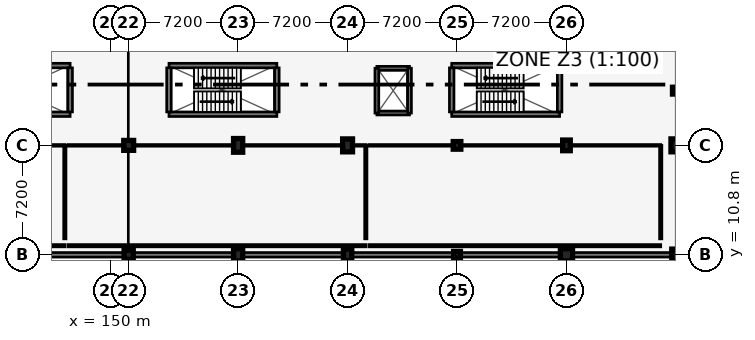
"""IFC4 building model, lengths in metres.
Left out: names, types, materials, properties, quantities, classifications, styles, units other than length and angle.
Written with IfcOpenShell. Run it as: python <this file> out.ifc"""

import sys

from ifc_helpers import new_model, si_unit, direction, frame, frame_2d, origin, origin_2d, place, context, subcontext, project, spatial, rectangle, extrude, element, fill, save


model = new_model("IFC4")
c1 = context("Model", 3, precision=1e-05, world=origin(), true_north=direction((0.0, 1.0)))
c2 = subcontext(c1, "Body", "Model", "MODEL_VIEW")
j1 = project(units=[si_unit("LENGTHUNIT", "METRE"), si_unit("PLANEANGLEUNIT", "RADIAN")], contexts=[c1])
p1 = place(None, origin())
s1 = spatial("IfcSite", under=j1, at=p1, CompositionType="ELEMENT")
p2 = place(p1, origin())
s2 = spatial("IfcBuilding", under=s1, at=p2, CompositionType="ELEMENT")
p3 = place(p2, frame((0.0, 0.0, 4.8)))
s3 = spatial("IfcBuildingStorey", under=s2, at=p3, CompositionType="ELEMENT", Elevation=4.8)
p4 = place(p3, frame((151.2, 10.8, 0.0), z_axis=(0.0, 0.0, 1.0), x_axis=(1.0, 0.0, 0.0)))
e1 = element("IfcColumn", 1, at=p4, inside=s3, PredefinedType="COLUMN", context=c2, shape_type="SweptSolid", body=[
    extrude(rectangle(XDim=0.6, YDim=0.6, at=origin_2d()), origin(), (0.0, 0.0, 1.0), 4.2),
])
p5 = place(p3, frame((151.2, 18.0, 0.0), z_axis=(0.0, 0.0, 1.0), x_axis=(1.0, 0.0, 0.0)))
e2 = element("IfcColumn", 2, at=p5, inside=s3, PredefinedType="COLUMN", context=c2, shape_type="SweptSolid", body=[
    extrude(rectangle(XDim=0.65, YDim=0.65, at=origin_2d()), origin(), (0.0, 0.0, 1.0), 4.2),
])
p6 = place(p3, frame((158.4, 10.8, 0.0), z_axis=(0.0, 0.0, 1.0), x_axis=(1.0, 0.0, 0.0)))
e3 = element("IfcColumn", 3, at=p6, inside=s3, PredefinedType="COLUMN", context=c2, shape_type="SweptSolid", body=[
    extrude(rectangle(XDim=0.6, YDim=0.8, at=origin_2d()), origin(), (0.0, 0.0, 1.0), 4.2),
])
p7 = place(p3, frame((158.4, 18.0, 0.0), z_axis=(0.0, 0.0, 1.0), x_axis=(1.0, 0.0, 0.0)))
e4 = element("IfcColumn", 4, at=p7, inside=s3, PredefinedType="COLUMN", context=c2, shape_type="SweptSolid", body=[
    extrude(rectangle(XDim=0.6, YDim=0.9, at=origin_2d()), origin(), (0.0, 0.0, 1.0), 4.2),
])
p8 = place(p3, frame((165.6, 10.8, 0.0), z_axis=(0.0, 0.0, 1.0), x_axis=(1.0, 0.0, 0.0)))
e5 = element("IfcColumn", 5, at=p8, inside=s3, PredefinedType="COLUMN", context=c2, shape_type="SweptSolid", body=[
    extrude(rectangle(XDim=0.55, YDim=0.75, at=origin_2d()), origin(), (0.0, 0.0, 1.0), 4.2),
])
p9 = place(p3, frame((165.6, 18.0, 0.0), z_axis=(0.0, 0.0, 1.0), x_axis=(1.0, 0.0, 0.0)))
e6 = element("IfcColumn", 6, at=p9, inside=s3, PredefinedType="COLUMN", context=c2, shape_type="SweptSolid", body=[
    extrude(rectangle(XDim=0.65, YDim=0.85, at=origin_2d()), origin(), (0.0, 0.0, 1.0), 4.2),
])
p10 = place(p3, frame((172.8, 10.8, 0.0), z_axis=(0.0, 0.0, 1.0), x_axis=(1.0, 0.0, 0.0)))
e7 = element("IfcColumn", 7, at=p10, inside=s3, PredefinedType="COLUMN", context=c2, shape_type="SweptSolid", body=[
    extrude(rectangle(XDim=0.45, YDim=0.45, at=origin_2d()), origin(), (0.0, 0.0, 1.0), 4.2),
])
p11 = place(p3, frame((172.8, 18.0, 0.0), z_axis=(0.0, 0.0, 1.0), x_axis=(1.0, 0.0, 0.0)))
e8 = element("IfcColumn", 8, at=p11, inside=s3, PredefinedType="COLUMN", context=c2, shape_type="SweptSolid", body=[
    extrude(rectangle(XDim=0.5, YDim=0.5, at=origin_2d()), origin(), (0.0, 0.0, 1.0), 4.2),
])
p12 = place(p3, frame((180.0, 10.8, 0.0), z_axis=(0.0, 0.0, 1.0), x_axis=(1.0, 0.0, 0.0)))
e9 = element("IfcColumn", 9, at=p12, inside=s3, PredefinedType="COLUMN", context=c2, shape_type="SweptSolid", body=[
    extrude(rectangle(XDim=0.8, YDim=0.8, at=origin_2d()), origin(), (0.0, 0.0, 1.0), 4.2),
])
p13 = place(p3, frame((180.0, 18.0, 0.0), z_axis=(0.0, 0.0, 1.0), x_axis=(1.0, 0.0, 0.0)))
e10 = element("IfcColumn", 10, at=p13, inside=s3, PredefinedType="COLUMN", context=c2, shape_type="SweptSolid", body=[
    extrude(rectangle(XDim=0.5, YDim=0.7, at=origin_2d()), origin(), (0.0, 0.0, 1.0), 4.2),
])
p14 = place(p3, frame((187.2, 10.8, 0.0), z_axis=(0.0, 0.0, 1.0), x_axis=(1.0, 0.0, 0.0)))
e11 = element("IfcColumn", 11, at=p14, inside=s3, PredefinedType="COLUMN", context=c2, shape_type="SweptSolid", body=[
    extrude(rectangle(XDim=0.55, YDim=0.75, at=origin_2d()), origin(), (0.0, 0.0, 1.0), 4.2),
])
p15 = place(p3, frame((187.2, 18.0, 0.0), z_axis=(0.0, 0.0, 1.0), x_axis=(1.0, 0.0, 0.0)))
e12 = element("IfcColumn", 12, at=p15, inside=s3, PredefinedType="COLUMN", context=c2, shape_type="SweptSolid", body=[
    extrude(rectangle(XDim=0.65, YDim=0.85, at=origin_2d()), origin(), (0.0, 0.0, 1.0), 4.2),
])
p16 = place(p3, frame((187.2, 21.6, 0.0), z_axis=(0.0, 0.0, 1.0), x_axis=(1.0, 0.0, 0.0)))
e13 = element("IfcColumn", 13, at=p16, inside=s3, PredefinedType="COLUMN", context=c2, shape_type="SweptSolid", body=[
    extrude(rectangle(XDim=0.45, YDim=0.45, at=origin_2d()), origin(), (0.0, 0.0, 1.0), 4.2),
])
p17 = place(p3, frame((108.0, 10.8, 0.0), z_axis=(0.0, 0.0, 1.0), x_axis=(1.0, 0.0, 0.0)))
e14 = element("IfcWall", 14, at=p17, inside=s3, PredefinedType="SOLIDWALL", context=c2, shape_type="SweptSolid", body=[
    extrude(rectangle(XDim=79.2, YDim=0.3, at=frame_2d((39.6, 0.0))), origin(), (0.0, 0.0, 1.0), 2.872),
])
p18 = place(p3, frame((140.25, 20.05, 0.0), z_axis=(0.0, 0.0, 1.0), x_axis=(1.0, 0.0, 0.0)))
e15 = element("IfcWall", 15, at=p18, inside=s3, PredefinedType="SHEAR", context=c2, shape_type="SweptSolid", body=[
    extrude(rectangle(XDim=7.1, YDim=0.3, at=frame_2d((3.55, 0.0))), origin(), (0.0, 0.0, 1.0), 3.84),
])
p19 = place(p18, frame((0.35, 0.0, 0.0)))
e16 = element("IfcOpeningElement", 16, at=p19, cuts=e15, PredefinedType="OPENING", context=c2, shape_type="SweptSolid", body=[
    extrude(rectangle(XDim=1.07, YDim=2.15, at=frame_2d((0.535, 1.075))), frame((0.0, 0.16, 0.0), z_axis=(0.0, -1.0, 0.0), x_axis=(1.0, 0.0, 0.0)), (0.0, 0.0, 1.0), 0.32),
])
p20 = place(p3, frame((147.35, 23.25, 0.0), z_axis=(0.0, 0.0, 1.0), x_axis=(-1.0, 0.0, 0.0)))
e17 = element("IfcWall", 17, at=p20, inside=s3, PredefinedType="SHEAR", context=c2, shape_type="SweptSolid", body=[
    extrude(rectangle(XDim=7.1, YDim=0.3, at=frame_2d((3.55, 0.0))), origin(), (0.0, 0.0, 1.0), 3.84),
])
p21 = place(p3, frame((147.35, 20.2, 0.0), z_axis=(0.0, 0.0, 1.0), x_axis=(0.0, 1.0, 0.0)))
e18 = element("IfcWall", 18, at=p21, inside=s3, PredefinedType="SHEAR", context=c2, shape_type="SweptSolid", body=[
    extrude(rectangle(XDim=2.9, YDim=0.3, at=frame_2d((1.45, 0.0))), origin(), (0.0, 0.0, 1.0), 3.84),
])
p22 = place(p3, frame((153.85, 20.05, 0.0), z_axis=(0.0, 0.0, 1.0), x_axis=(1.0, 0.0, 0.0)))
e19 = element("IfcWall", 19, at=p22, inside=s3, PredefinedType="SHEAR", context=c2, shape_type="SweptSolid", body=[
    extrude(rectangle(XDim=7.1, YDim=0.3, at=frame_2d((3.55, 0.0))), origin(), (0.0, 0.0, 1.0), 3.84),
])
p23 = place(p22, frame((0.35, 0.0, 0.0)))
e20 = element("IfcOpeningElement", 20, at=p23, cuts=e19, PredefinedType="OPENING", context=c2, shape_type="SweptSolid", body=[
    extrude(rectangle(XDim=1.07, YDim=2.15, at=frame_2d((0.535, 1.075))), frame((0.0, 0.16, 0.0), z_axis=(0.0, -1.0, 0.0), x_axis=(1.0, 0.0, 0.0)), (0.0, 0.0, 1.0), 0.32),
])
p24 = place(p3, frame((160.95, 23.25, 0.0), z_axis=(0.0, 0.0, 1.0), x_axis=(-1.0, 0.0, 0.0)))
e21 = element("IfcWall", 21, at=p24, inside=s3, PredefinedType="SHEAR", context=c2, shape_type="SweptSolid", body=[
    extrude(rectangle(XDim=7.1, YDim=0.3, at=frame_2d((3.55, 0.0))), origin(), (0.0, 0.0, 1.0), 3.84),
])
for number, where, z_axis, x_axis in (
    (22, (160.95, 20.2, 0.0), (0.0, 0.0, 1.0), (0.0, 1.0, 0.0)),
    (23, (153.85, 23.1, 0.0), (0.0, 0.0, 1.0), (0.0, -1.0, 0.0)),
):
    element("IfcWall", number, at=place(p3, frame(where, z_axis=z_axis, x_axis=x_axis)), inside=s3, PredefinedType="SHEAR", context=c2, shape_type="SweptSolid", body=[
        extrude(rectangle(XDim=2.9, YDim=0.3, at=frame_2d((1.45, 0.0))), origin(), (0.0, 0.0, 1.0), 3.84),
    ])
p25 = place(p3, frame((172.45, 20.05, 0.0), z_axis=(0.0, 0.0, 1.0), x_axis=(1.0, 0.0, 0.0)))
e24 = element("IfcWall", 24, at=p25, inside=s3, PredefinedType="SHEAR", context=c2, shape_type="SweptSolid", body=[
    extrude(rectangle(XDim=7.1, YDim=0.3, at=frame_2d((3.55, 0.0))), origin(), (0.0, 0.0, 1.0), 3.84),
])
p26 = place(p25, frame((0.35, 0.0, 0.0)))
e25 = element("IfcOpeningElement", 25, at=p26, cuts=e24, PredefinedType="OPENING", context=c2, shape_type="SweptSolid", body=[
    extrude(rectangle(XDim=1.07, YDim=2.15, at=frame_2d((0.535, 1.075))), frame((0.0, 0.16, 0.0), z_axis=(0.0, -1.0, 0.0), x_axis=(1.0, 0.0, 0.0)), (0.0, 0.0, 1.0), 0.32),
])
p27 = place(p3, frame((179.55, 23.25, 0.0), z_axis=(0.0, 0.0, 1.0), x_axis=(-1.0, 0.0, 0.0)))
e26 = element("IfcWall", 26, at=p27, inside=s3, PredefinedType="SHEAR", context=c2, shape_type="SweptSolid", body=[
    extrude(rectangle(XDim=7.1, YDim=0.3, at=frame_2d((3.55, 0.0))), origin(), (0.0, 0.0, 1.0), 3.84),
])
for number, where, z_axis, x_axis in (
    (27, (179.55, 20.2, 0.0), (0.0, 0.0, 1.0), (0.0, 1.0, 0.0)),
    (28, (172.45, 23.1, 0.0), (0.0, 0.0, 1.0), (0.0, -1.0, 0.0)),
):
    element("IfcWall", number, at=place(p3, frame(where, z_axis=z_axis, x_axis=x_axis)), inside=s3, PredefinedType="SHEAR", context=c2, shape_type="SweptSolid", body=[
        extrude(rectangle(XDim=2.9, YDim=0.3, at=frame_2d((1.45, 0.0))), origin(), (0.0, 0.0, 1.0), 3.84),
    ])
p28 = place(p3, frame((167.525, 20.125, 0.0), z_axis=(0.0, 0.0, 1.0), x_axis=(1.0, 0.0, 0.0)))
e29 = element("IfcWall", 29, at=p28, inside=s3, PredefinedType="SHEAR", context=c2, shape_type="SweptSolid", body=[
    extrude(rectangle(XDim=2.15, YDim=0.25, at=frame_2d((1.075, 0.0))), origin(), (0.0, 0.0, 1.0), 3.9),
])
p29 = place(p3, frame((169.675, 23.075, 0.0), z_axis=(0.0, 0.0, 1.0), x_axis=(-1.0, 0.0, 0.0)))
e30 = element("IfcWall", 30, at=p29, inside=s3, PredefinedType="SHEAR", context=c2, shape_type="SweptSolid", body=[
    extrude(rectangle(XDim=2.15, YDim=0.25, at=frame_2d((1.075, 0.0))), origin(), (0.0, 0.0, 1.0), 3.9),
])
p30 = place(p29, frame((0.525, 0.0, 0.0)))
e31 = element("IfcOpeningElement", 31, at=p30, cuts=e30, PredefinedType="OPENING", context=c2, shape_type="SweptSolid", body=[
    extrude(rectangle(XDim=1.1, YDim=2.15, at=frame_2d((0.55, 1.075))), frame((0.0, 0.135, 0.0), z_axis=(0.0, -1.0, 0.0), x_axis=(1.0, 0.0, 0.0)), (0.0, 0.0, 1.0), 0.27),
])
for number, where, z_axis, x_axis in (
    (32, (167.525, 23.075, 0.0), (0.0, 0.0, 1.0), (0.0, -1.0, 0.0)),
    (33, (169.675, 20.125, 0.0), (0.0, 0.0, 1.0), (0.0, 1.0, 0.0)),
):
    element("IfcWall", number, at=place(p3, frame(where, z_axis=z_axis, x_axis=x_axis)), inside=s3, PredefinedType="SHEAR", context=c2, shape_type="SweptSolid", body=[
        extrude(rectangle(XDim=2.95, YDim=0.25, at=frame_2d((1.475, 0.0))), origin(), (0.0, 0.0, 1.0), 3.9),
    ])
p31 = place(p3, frame((147.0, 11.4, 0.0), z_axis=(0.0, 0.0, 1.0), x_axis=(-1.0, 0.0, 0.0)))
e34 = element("IfcWall", 34, at=p31, inside=s3, PredefinedType="PARTITIONING", context=c2, shape_type="SweptSolid", body=[
    extrude(rectangle(XDim=18.8, YDim=0.15, at=frame_2d((9.4, 0.0))), origin(), (0.0, 0.0, 1.0), 3.122),
])
p32 = place(p3, frame((147.0, 11.85, 0.0), z_axis=(0.0, 0.0, 1.0), x_axis=(0.0, 1.0, 0.0)))
e35 = element("IfcWall", 35, at=p32, inside=s3, PredefinedType="PARTITIONING", context=c2, shape_type="SweptSolid", body=[
    extrude(rectangle(XDim=6.15, YDim=0.15, at=frame_2d((3.075, 0.0))), origin(), (0.0, 0.0, 1.0), 3.372),
])
p33 = place(p3, frame((128.2, 18.0, 0.0), z_axis=(0.0, 0.0, 1.0), x_axis=(1.0, 0.0, 0.0)))
e36 = element("IfcWall", 36, at=p33, inside=s3, PredefinedType="PARTITIONING", context=c2, shape_type="SweptSolid", body=[
    extrude(rectangle(XDim=18.8, YDim=0.11, at=frame_2d((9.4, 0.0))), origin(), (0.0, 0.0, 1.0), 2.822),
])
p34 = place(p33, frame((5.322, 0.0, 0.0)))
e37 = element("IfcOpeningElement", 37, at=p34, cuts=e36, PredefinedType="OPENING", context=c2, shape_type="SweptSolid", body=[
    extrude(rectangle(XDim=1.06, YDim=2.15, at=frame_2d((0.53, 1.075))), frame((0.0, 0.065, 0.0), z_axis=(0.0, -1.0, 0.0), x_axis=(1.0, 0.0, 0.0)), (0.0, 0.0, 1.0), 0.13),
])
p35 = place(p3, frame((166.8, 11.4, 0.0), z_axis=(0.0, 0.0, 1.0), x_axis=(-1.0, 0.0, 0.0)))
e38 = element("IfcWall", 38, at=p35, inside=s3, PredefinedType="PARTITIONING", context=c2, shape_type="SweptSolid", body=[
    extrude(rectangle(XDim=19.6, YDim=0.15, at=frame_2d((9.8, 0.0))), origin(), (0.0, 0.0, 1.0), 3.072),
])
p36 = place(p3, frame((166.8, 11.85, 0.0), z_axis=(0.0, 0.0, 1.0), x_axis=(0.0, 1.0, 0.0)))
e39 = element("IfcWall", 39, at=p36, inside=s3, PredefinedType="PARTITIONING", context=c2, shape_type="SweptSolid", body=[
    extrude(rectangle(XDim=6.15, YDim=0.15, at=frame_2d((3.075, 0.0))), origin(), (0.0, 0.0, 1.0), 3.272),
])
p37 = place(p3, frame((147.2, 18.0, 0.0), z_axis=(0.0, 0.0, 1.0), x_axis=(1.0, 0.0, 0.0)))
e40 = element("IfcWall", 40, at=p37, inside=s3, PredefinedType="PARTITIONING", context=c2, shape_type="SweptSolid", body=[
    extrude(rectangle(XDim=19.6, YDim=0.11, at=frame_2d((9.8, 0.0))), origin(), (0.0, 0.0, 1.0), 3.222),
])
p38 = place(p37, frame((9.28, 0.0, 0.0)))
e41 = element("IfcOpeningElement", 41, at=p38, cuts=e40, PredefinedType="OPENING", context=c2, shape_type="SweptSolid", body=[
    extrude(rectangle(XDim=1.04, YDim=2.15, at=frame_2d((0.52, 1.075))), frame((0.0, 0.065, 0.0), z_axis=(0.0, -1.0, 0.0), x_axis=(1.0, 0.0, 0.0)), (0.0, 0.0, 1.0), 0.13),
])
p39 = place(p3, frame((186.2, 11.4, 0.0), z_axis=(0.0, 0.0, 1.0), x_axis=(-1.0, 0.0, 0.0)))
e42 = element("IfcWall", 42, at=p39, inside=s3, PredefinedType="PARTITIONING", context=c2, shape_type="SweptSolid", body=[
    extrude(rectangle(XDim=19.2, YDim=0.15, at=frame_2d((9.6, 0.0))), origin(), (0.0, 0.0, 1.0), 2.872),
])
p40 = place(p3, frame((186.2, 11.85, 0.0), z_axis=(0.0, 0.0, 1.0), x_axis=(0.0, 1.0, 0.0)))
e43 = element("IfcWall", 43, at=p40, inside=s3, PredefinedType="PARTITIONING", context=c2, shape_type="SweptSolid", body=[
    extrude(rectangle(XDim=6.15, YDim=0.15, at=frame_2d((3.075, 0.0))), origin(), (0.0, 0.0, 1.0), 3.222),
])
p41 = place(p3, frame((167.0, 18.0, 0.0), z_axis=(0.0, 0.0, 1.0), x_axis=(1.0, 0.0, 0.0)))
e44 = element("IfcWall", 44, at=p41, inside=s3, PredefinedType="PARTITIONING", context=c2, shape_type="SweptSolid", body=[
    extrude(rectangle(XDim=19.2, YDim=0.11, at=frame_2d((9.6, 0.0))), origin(), (0.0, 0.0, 1.0), 3.172),
])
p42 = place(p41, frame((8.7, 0.0, 0.0)))
e45 = element("IfcOpeningElement", 45, at=p42, cuts=e44, PredefinedType="OPENING", context=c2, shape_type="SweptSolid", body=[
    extrude(rectangle(XDim=1.8, YDim=2.2, at=frame_2d((0.9, 1.1))), frame((0.0, 0.065, 0.0), z_axis=(0.0, -1.0, 0.0), x_axis=(1.0, 0.0, 0.0)), (0.0, 0.0, 1.0), 0.13),
])
p43 = place(p23, origin())
e46 = element("IfcDoor", 46, at=p43, inside=s3, OperationType="SINGLE_SWING_RIGHT", PredefinedType="DOOR", context=c2, shape_type="SweptSolid", body=[
    extrude(rectangle(XDim=1.07, YDim=2.15, at=frame_2d((0.535, 1.075))), frame((0.0, 0.025, 0.0), z_axis=(0.0, -1.0, 0.0), x_axis=(1.0, 0.0, 0.0)), (0.0, 0.0, 1.0), 0.05),
])
fill(e20, e46)
p44 = place(p26, origin())
e47 = element("IfcDoor", 47, at=p44, inside=s3, OperationType="SINGLE_SWING_RIGHT", PredefinedType="DOOR", context=c2, shape_type="SweptSolid", body=[
    extrude(rectangle(XDim=1.07, YDim=2.15, at=frame_2d((0.535, 1.075))), frame((0.0, 0.025, 0.0), z_axis=(0.0, -1.0, 0.0), x_axis=(1.0, 0.0, 0.0)), (0.0, 0.0, 1.0), 0.05),
])
fill(e25, e47)
p45 = place(p30, origin())
e48 = element("IfcDoor", 48, at=p45, inside=s3, OperationType="SLIDING_TO_LEFT", PredefinedType="DOOR", context=c2, shape_type="SweptSolid", body=[
    extrude(rectangle(XDim=1.1, YDim=2.15, at=frame_2d((0.55, 1.075))), frame((0.0, 0.025, 0.0), z_axis=(0.0, -1.0, 0.0), x_axis=(1.0, 0.0, 0.0)), (0.0, 0.0, 1.0), 0.05),
])
fill(e31, e48)
p46 = place(p38, origin())
e49 = element("IfcDoor", 49, at=p46, inside=s3, OperationType="SINGLE_SWING_LEFT", PredefinedType="DOOR", context=c2, shape_type="SweptSolid", body=[
    extrude(rectangle(XDim=1.04, YDim=2.15, at=frame_2d((0.52, 1.075))), frame((0.0, 0.025, 0.0), z_axis=(0.0, -1.0, 0.0), x_axis=(1.0, 0.0, 0.0)), (0.0, 0.0, 1.0), 0.05),
])
fill(e41, e49)
p47 = place(p42, origin())
e50 = element("IfcDoor", 50, at=p47, inside=s3, OperationType="DOUBLE_SWING_RIGHT", PredefinedType="DOOR", context=c2, shape_type="SweptSolid", body=[
    extrude(rectangle(XDim=1.8, YDim=2.2, at=frame_2d((0.9, 1.1))), frame((0.0, 0.025, 0.0), z_axis=(0.0, -1.0, 0.0), x_axis=(1.0, 0.0, 0.0)), (0.0, 0.0, 1.0), 0.05),
])
fill(e45, e50)
save(model, sys.argv[1])
